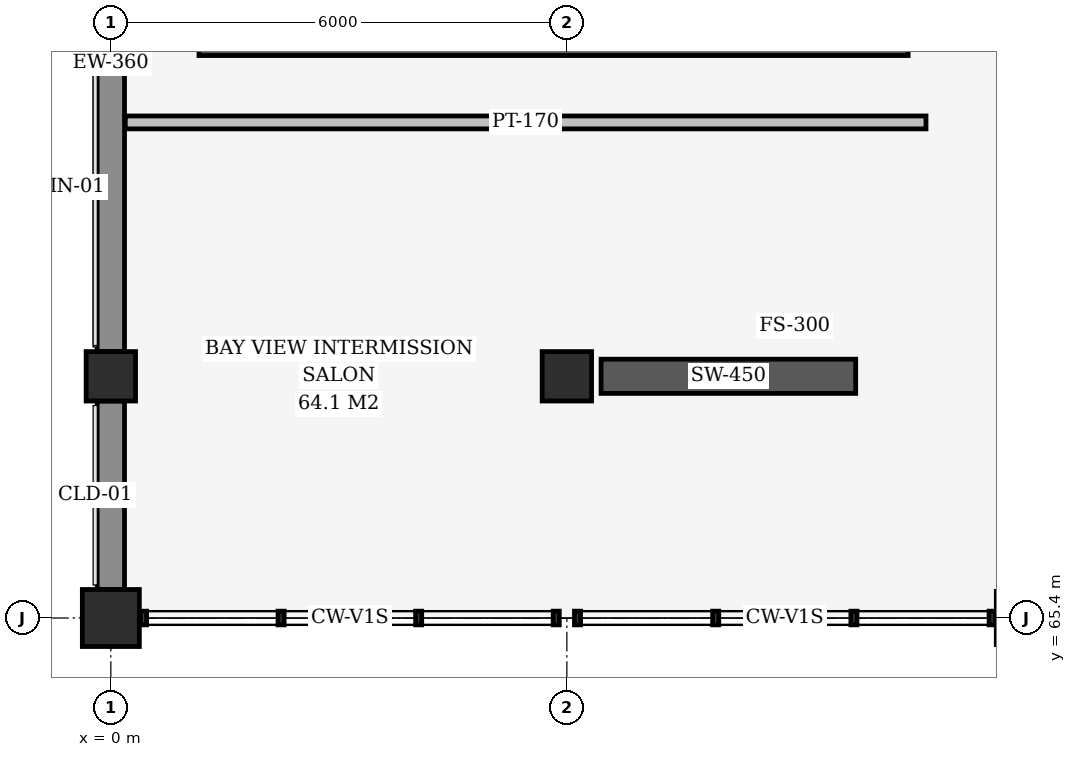
"""IFC4 building model, lengths in metres.
Left out: names, types, materials, properties, quantities, classifications, styles, units other than length and angle.
Written with IfcOpenShell. Run it as: python <this file> out.ifc"""

import sys

from ifc_helpers import new_model, si_unit, direction, frame, frame_2d, origin, origin_2d, place, context, subcontext, project, spatial, rectangle, extrude, element, save


model = new_model("IFC4")
c1 = context("Model", 3, precision=1e-05, world=origin(), true_north=direction((0.0, 1.0)))
c2 = subcontext(c1, "Body", "Model", "MODEL_VIEW")
j1 = project(units=[si_unit("LENGTHUNIT", "METRE"), si_unit("PLANEANGLEUNIT", "RADIAN")], contexts=[c1])
p1 = place(None, origin())
s1 = spatial("IfcSite", under=j1, at=p1, CompositionType="ELEMENT")
p2 = place(p1, origin())
s2 = spatial("IfcBuilding", under=s1, at=p2, CompositionType="ELEMENT")
p3 = place(p2, frame((0.0, 0.0, 13.8)))
s3 = spatial("IfcBuildingStorey", under=s2, at=p3, CompositionType="ELEMENT", Elevation=13.8)
p4 = place(p3, frame((0.0, 65.4, 0.0), z_axis=(0.0, 0.0, 1.0), x_axis=(1.0, 0.0, 0.0)))
e1 = element("IfcColumn", 1, at=p4, inside=s3, PredefinedType="COLUMN", context=c2, shape_type="SweptSolid", body=[
    extrude(rectangle(XDim=0.75, YDim=0.75, at=origin_2d()), origin(), (0.0, 0.0, 1.0), 4.5),
])
for number, where, z_axis, x_axis in (
    (2, (0.0, 68.58, 0.0), (0.0, 0.0, 1.0), (1.0, 0.0, 0.0)),
    (3, (6.0, 68.58, 0.0), (0.0, 0.0, 1.0), (1.0, 0.0, 0.0)),
):
    element("IfcColumn", number, at=place(p3, frame(where, z_axis=z_axis, x_axis=x_axis)), inside=s3, PredefinedType="COLUMN", context=c2, shape_type="SweptSolid", body=[
        extrude(rectangle(XDim=0.65, YDim=0.65, at=origin_2d()), origin(), (0.0, 0.0, 1.0), 4.5),
    ])
p5 = place(p3, frame((6.45, 68.58, 0.0), z_axis=(0.0, 0.0, 1.0), x_axis=(1.0, 0.0, 0.0)))
e4 = element("IfcWall", 4, at=p5, inside=s3, PredefinedType="SHEAR", context=c2, shape_type="SweptSolid", body=[
    extrude(rectangle(XDim=3.35, YDim=0.45, at=frame_2d((1.675, 0.0))), origin(), (0.0, 0.0, 1.0), 3.505),
])
p6 = place(p3, frame((0.0, 65.775, 0.0), z_axis=(0.0, 0.0, 1.0), x_axis=(0.0, 1.0, 0.0)))
e5 = element("IfcWall", 5, at=p6, inside=s3, PredefinedType="SOLIDWALL", context=c2, shape_type="SweptSolid", body=[
    extrude(rectangle(XDim=2.48, YDim=0.36, at=frame_2d((1.24, 0.0))), origin(), (0.0, 0.0, 1.0), 3.568),
])
p7 = place(p3, frame((0.0, 68.905, 0.0), z_axis=(0.0, 0.0, 1.0), x_axis=(0.0, 1.0, 0.0)))
e6 = element("IfcWall", 6, at=p7, inside=s3, PredefinedType="SOLIDWALL", context=c2, shape_type="SweptSolid", body=[
    extrude(rectangle(XDim=13.57, YDim=0.36, at=frame_2d((6.785, 0.0))), origin(), (0.0, 0.0, 1.0), 3.569),
])
p8 = place(p7, frame((5.51, 0.0, 0.85)))
e7 = element("IfcOpeningElement", 7, at=p8, cuts=e6, PredefinedType="OPENING", context=c2, shape_type="SweptSolid", body=[
    extrude(rectangle(XDim=2.55, YDim=1.05, at=frame_2d((1.275, 0.525))), frame((0.0, 0.19, 0.0), z_axis=(0.0, -1.0, 0.0), x_axis=(1.0, 0.0, 0.0)), (0.0, 0.0, 1.0), 0.38),
])
p9 = place(p3, frame((1.16, 72.945, 0.0), z_axis=(0.0, 0.0, 1.0), x_axis=(1.0, 0.0, 0.0)))
e8 = element("IfcWall", 8, at=p9, inside=s3, PredefinedType="SHEAR", context=c2, shape_type="SweptSolid", body=[
    extrude(rectangle(XDim=9.33, YDim=0.29, at=frame_2d((4.665, 0.0))), origin(), (0.0, 0.0, 1.0), 4.2),
])
p10 = place(p3, frame((0.19, 71.92, 0.0), z_axis=(0.0, 0.0, 1.0), x_axis=(1.0, 0.0, 0.0)))
e9 = element("IfcWall", 9, at=p10, inside=s3, PredefinedType="PARTITIONING", context=c2, shape_type="SweptSolid", body=[
    extrude(rectangle(XDim=10.535, YDim=0.17, at=frame_2d((5.268, 0.0))), origin(), (0.0, 0.0, 1.0), 4.18),
])
save(model, sys.argv[1])
